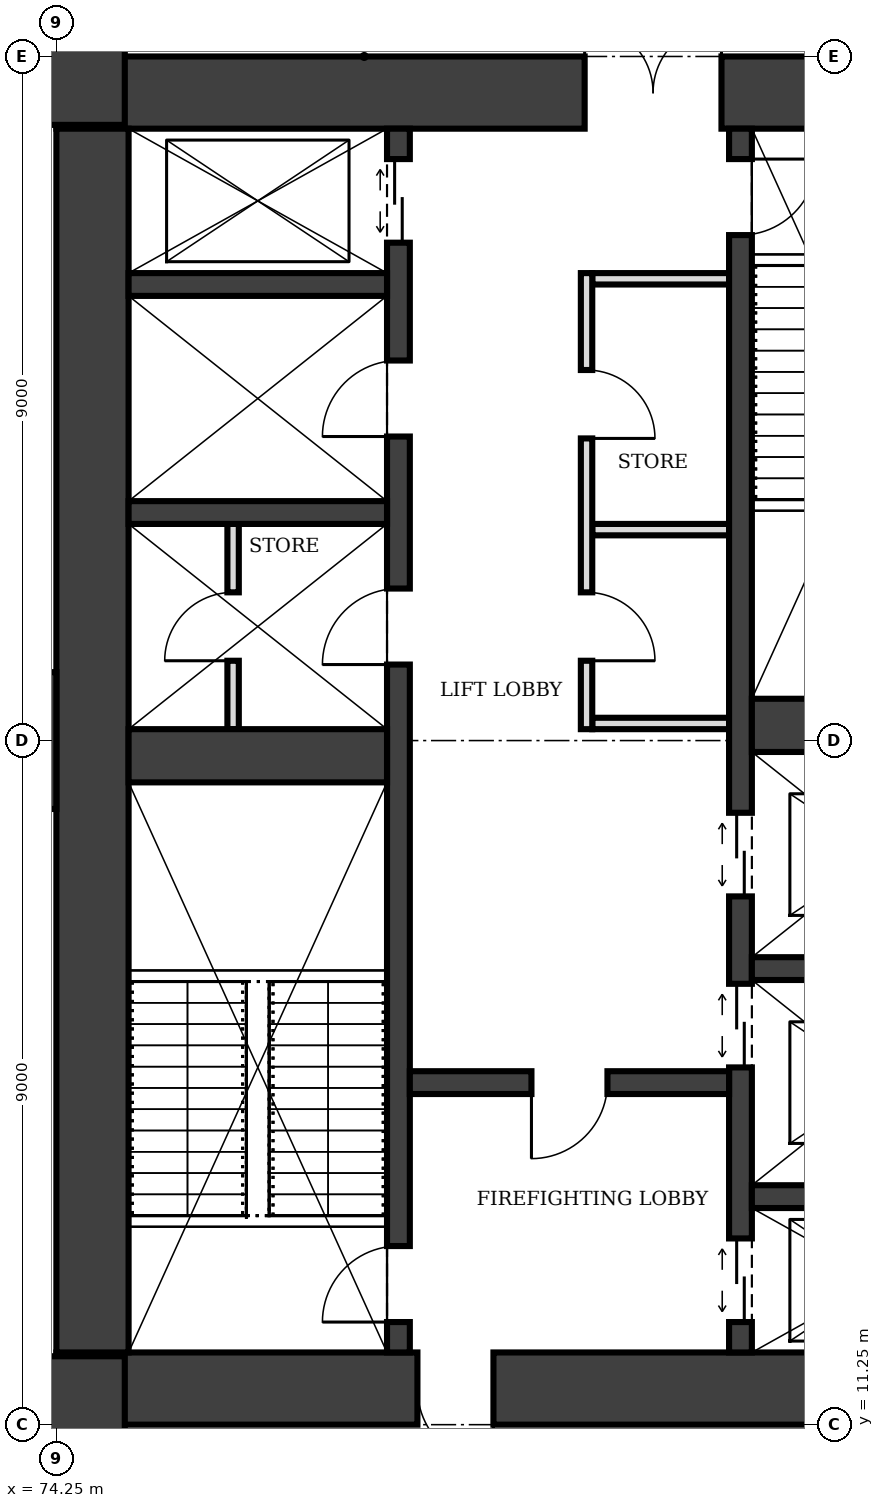
"""IFC4 building model, lengths in metres.
Left out: names, types, materials, properties, quantities, classifications, styles, units other than length and angle.
Written with IfcOpenShell. Run it as: python <this file> out.ifc"""

import sys

from ifc_helpers import new_model, si_unit, direction, frame, frame_2d, origin, place, context, subcontext, project, spatial, rectangle, extrude, element, fill, save


model = new_model("IFC4")
c1 = context("Model", 3, precision=1e-05, world=origin(), true_north=direction((0.0, 1.0)))
c2 = subcontext(c1, "Body", "Model", "MODEL_VIEW")
j1 = project(units=[si_unit("LENGTHUNIT", "METRE"), si_unit("PLANEANGLEUNIT", "RADIAN")], contexts=[c1])
p1 = place(None, origin())
s1 = spatial("IfcSite", under=j1, at=p1, CompositionType="ELEMENT")
p2 = place(p1, origin())
s2 = spatial("IfcBuilding", under=s1, at=p2, CompositionType="ELEMENT")
p3 = place(p2, frame((0.0, 0.0, 169.0)))
s3 = spatial("IfcBuildingStorey", under=s2, at=p3, CompositionType="ELEMENT", Elevation=169.0)
p4 = place(p3, frame((74.25, 11.725, 0.0), z_axis=(0.0, 0.0, 1.0), x_axis=(1.0, 0.0, 0.0)))
e1 = element("IfcWall", 1, at=p4, inside=s3, PredefinedType="SHEAR", context=c2, shape_type="SweptSolid", body=[
    extrude(rectangle(XDim=13.5, YDim=0.95, at=frame_2d((6.75, 0.0))), origin(), (0.0, 0.0, 1.0), 8.0),
])
p5 = place(p4, frame((4.75, 0.0, 0.0)))
e2 = element("IfcOpeningElement", 2, at=p5, cuts=e1, PredefinedType="OPENING", context=c2, shape_type="SweptSolid", body=[
    extrude(rectangle(XDim=1.0, YDim=2.1, at=frame_2d((0.5, 1.05))), frame((0.0, 0.485, 0.0), z_axis=(0.0, -1.0, 0.0), x_axis=(1.0, 0.0, 0.0)), (0.0, 0.0, 1.0), 0.97),
])
p6 = place(p3, frame((87.75, 28.775, 0.0), z_axis=(0.0, 0.0, 1.0), x_axis=(-1.0, 0.0, 0.0)))
e3 = element("IfcWall", 3, at=p6, inside=s3, PredefinedType="SHEAR", context=c2, shape_type="SweptSolid", body=[
    extrude(rectangle(XDim=13.5, YDim=0.95, at=frame_2d((6.75, 0.0))), origin(), (0.0, 0.0, 1.0), 8.0),
])
p7 = place(p6, frame((4.75, 0.0, 0.0)))
e4 = element("IfcOpeningElement", 4, at=p7, cuts=e3, PredefinedType="OPENING", context=c2, shape_type="SweptSolid", body=[
    extrude(rectangle(XDim=1.8, YDim=2.1, at=frame_2d((0.9, 1.05))), frame((0.0, 0.485, 0.0), z_axis=(0.0, -1.0, 0.0), x_axis=(1.0, 0.0, 0.0)), (0.0, 0.0, 1.0), 0.97),
])
p8 = place(p3, frame((74.725, 28.3, 0.0), z_axis=(0.0, 0.0, 1.0), x_axis=(0.0, -1.0, 0.0)))
e5 = element("IfcWall", 5, at=p8, inside=s3, PredefinedType="SHEAR", context=c2, shape_type="SweptSolid", body=[
    extrude(rectangle(XDim=16.1, YDim=0.95, at=frame_2d((8.05, 0.0))), origin(), (0.0, 0.0, 1.0), 8.0),
])
p9 = place(p3, frame((78.75, 12.2, 0.0), z_axis=(0.0, 0.0, 1.0), x_axis=(0.0, 1.0, 0.0)))
e6 = element("IfcWall", 6, at=p9, inside=s3, PredefinedType="SHEAR", context=c2, shape_type="SweptSolid", body=[
    extrude(rectangle(XDim=16.1, YDim=0.3, at=frame_2d((8.05, 0.0))), origin(), (0.0, 0.0, 1.0), 8.0),
])
p10 = place(p9, frame((0.4, 0.0, 0.0)))
e7 = element("IfcOpeningElement", 7, at=p10, cuts=e6, PredefinedType="OPENING", context=c2, shape_type="SweptSolid", body=[
    extrude(rectangle(XDim=1.0, YDim=2.1, at=frame_2d((0.5, 1.05))), frame((0.0, 0.16, 0.0), z_axis=(0.0, -1.0, 0.0), x_axis=(1.0, 0.0, 0.0)), (0.0, 0.0, 1.0), 0.32),
])
p11 = place(p9, frame((14.6, 0.0, 0.0)))
e8 = element("IfcOpeningElement", 8, at=p11, cuts=e6, PredefinedType="OPENING", context=c2, shape_type="SweptSolid", body=[
    extrude(rectangle(XDim=1.1, YDim=2.1, at=frame_2d((0.55, 1.05))), frame((0.0, 0.16, 0.0), z_axis=(0.0, -1.0, 0.0), x_axis=(1.0, 0.0, 0.0)), (0.0, 0.0, 1.0), 0.32),
])
p12 = place(p9, frame((9.05, 0.0, 0.0)))
e9 = element("IfcOpeningElement", 9, at=p12, cuts=e6, PredefinedType="OPENING", context=c2, shape_type="SweptSolid", body=[
    extrude(rectangle(XDim=1.0, YDim=2.1, at=frame_2d((0.5, 1.05))), frame((0.0, 0.16, 0.0), z_axis=(0.0, -1.0, 0.0), x_axis=(1.0, 0.0, 0.0)), (0.0, 0.0, 1.0), 0.32),
])
p13 = place(p9, frame((12.05, 0.0, 0.0)))
e10 = element("IfcOpeningElement", 10, at=p13, cuts=e6, PredefinedType="OPENING", context=c2, shape_type="SweptSolid", body=[
    extrude(rectangle(XDim=1.0, YDim=2.1, at=frame_2d((0.5, 1.05))), frame((0.0, 0.16, 0.0), z_axis=(0.0, -1.0, 0.0), x_axis=(1.0, 0.0, 0.0)), (0.0, 0.0, 1.0), 0.32),
])
p14 = place(p3, frame((83.25, 12.2, 0.0), z_axis=(0.0, 0.0, 1.0), x_axis=(0.0, 1.0, 0.0)))
e11 = element("IfcWall", 11, at=p14, inside=s3, PredefinedType="SHEAR", context=c2, shape_type="SweptSolid", body=[
    extrude(rectangle(XDim=16.1, YDim=0.3, at=frame_2d((8.05, 0.0))), origin(), (0.0, 0.0, 1.0), 8.0),
])
p15 = place(p14, frame((14.7, 0.0, 0.0)))
e12 = element("IfcOpeningElement", 12, at=p15, cuts=e11, PredefinedType="OPENING", context=c2, shape_type="SweptSolid", body=[
    extrude(rectangle(XDim=1.0, YDim=2.1, at=frame_2d((0.5, 1.05))), frame((0.0, 0.16, 0.0), z_axis=(0.0, -1.0, 0.0), x_axis=(1.0, 0.0, 0.0)), (0.0, 0.0, 1.0), 0.32),
])
p16 = place(p14, frame((0.4, 0.0, 0.0)))
e13 = element("IfcOpeningElement", 13, at=p16, cuts=e11, PredefinedType="OPENING", context=c2, shape_type="SweptSolid", body=[
    extrude(rectangle(XDim=1.1, YDim=2.1, at=frame_2d((0.55, 1.05))), frame((0.0, 0.16, 0.0), z_axis=(0.0, -1.0, 0.0), x_axis=(1.0, 0.0, 0.0)), (0.0, 0.0, 1.0), 0.32),
])
p17 = place(p14, frame((3.75, 0.0, 0.0)))
e14 = element("IfcOpeningElement", 14, at=p17, cuts=e11, PredefinedType="OPENING", context=c2, shape_type="SweptSolid", body=[
    extrude(rectangle(XDim=1.1, YDim=2.1, at=frame_2d((0.55, 1.05))), frame((0.0, 0.16, 0.0), z_axis=(0.0, -1.0, 0.0), x_axis=(1.0, 0.0, 0.0)), (0.0, 0.0, 1.0), 0.32),
])
p18 = place(p14, frame((6.0, 0.0, 0.0)))
e15 = element("IfcOpeningElement", 15, at=p18, cuts=e11, PredefinedType="OPENING", context=c2, shape_type="SweptSolid", body=[
    extrude(rectangle(XDim=1.1, YDim=2.1, at=frame_2d((0.55, 1.05))), frame((0.0, 0.16, 0.0), z_axis=(0.0, -1.0, 0.0), x_axis=(1.0, 0.0, 0.0)), (0.0, 0.0, 1.0), 0.32),
])
p19 = place(p3, frame((75.2, 20.05, 0.0), z_axis=(0.0, 0.0, 1.0), x_axis=(1.0, 0.0, 0.0)))
e16 = element("IfcWall", 16, at=p19, inside=s3, PredefinedType="SHEAR", context=c2, shape_type="SweptSolid", body=[
    extrude(rectangle(XDim=3.4, YDim=0.7, at=frame_2d((1.7, 0.0))), origin(), (0.0, 0.0, 1.0), 8.0),
])
p20 = place(p3, frame((78.9, 15.75, 0.0), z_axis=(0.0, 0.0, 1.0), x_axis=(1.0, 0.0, 0.0)))
e17 = element("IfcWall", 17, at=p20, inside=s3, PredefinedType="SHEAR", context=c2, shape_type="SweptSolid", body=[
    extrude(rectangle(XDim=4.2, YDim=0.3, at=frame_2d((2.1, 0.0))), origin(), (0.0, 0.0, 1.0), 8.0),
])
p21 = place(p20, frame((1.6, 0.0, 0.0)))
e18 = element("IfcOpeningElement", 18, at=p21, cuts=e17, PredefinedType="OPENING", context=c2, shape_type="SweptSolid", body=[
    extrude(rectangle(XDim=1.0, YDim=2.1, at=frame_2d((0.5, 1.05))), frame((0.0, 0.16, 0.0), z_axis=(0.0, -1.0, 0.0), x_axis=(1.0, 0.0, 0.0)), (0.0, 0.0, 1.0), 0.32),
])
for number, where, z_axis, x_axis in (
    (19, (83.4, 14.25, 0.0), (0.0, 0.0, 1.0), (1.0, 0.0, 0.0)),
    (20, (83.4, 17.25, 0.0), (0.0, 0.0, 1.0), (1.0, 0.0, 0.0)),
):
    element("IfcWall", number, at=place(p3, frame(where, z_axis=z_axis, x_axis=x_axis)), inside=s3, PredefinedType="SHEAR", context=c2, shape_type="SweptSolid", body=[
        extrude(rectangle(XDim=3.4, YDim=0.3, at=frame_2d((1.7, 0.0))), origin(), (0.0, 0.0, 1.0), 8.0),
    ])
p22 = place(p3, frame((83.4, 20.45, 0.0), z_axis=(0.0, 0.0, 1.0), x_axis=(1.0, 0.0, 0.0)))
e21 = element("IfcWall", 21, at=p22, inside=s3, PredefinedType="SHEAR", context=c2, shape_type="SweptSolid", body=[
    extrude(rectangle(XDim=3.4, YDim=0.7, at=frame_2d((1.7, 0.0))), origin(), (0.0, 0.0, 1.0), 8.0),
])
for number, where, z_axis, x_axis in (
    (22, (75.2, 23.25, 0.0), (0.0, 0.0, 1.0), (1.0, 0.0, 0.0)),
    (23, (75.2, 26.25, 0.0), (0.0, 0.0, 1.0), (1.0, 0.0, 0.0)),
):
    element("IfcWall", number, at=place(p3, frame(where, z_axis=z_axis, x_axis=x_axis)), inside=s3, PredefinedType="SHEAR", context=c2, shape_type="SweptSolid", body=[
        extrude(rectangle(XDim=3.4, YDim=0.3, at=frame_2d((1.7, 0.0))), origin(), (0.0, 0.0, 1.0), 8.0),
    ])
p23 = place(p3, frame((74.25, 4.5, 0.0), z_axis=(0.0, 0.0, 1.0), x_axis=(0.0, 1.0, 0.0)))
e24 = element("IfcWall", 24, at=p23, inside=s3, PredefinedType="SHEAR", context=c2, shape_type="SweptSolid", body=[
    extrude(rectangle(XDim=7.65, YDim=1.8, at=frame_2d((3.825, 0.0))), origin(), (0.0, 0.0, 1.0), 8.0),
])
p24 = place(p23, frame((2.775, 0.0, 0.0)))
e25 = element("IfcOpeningElement", 25, at=p24, cuts=e24, PredefinedType="OPENING", context=c2, shape_type="SweptSolid", body=[
    extrude(rectangle(XDim=1.2, YDim=2.1, at=frame_2d((0.6, 1.05))), frame((0.0, 0.91, 0.0), z_axis=(0.0, -1.0, 0.0), x_axis=(1.0, 0.0, 0.0)), (0.0, 0.0, 1.0), 1.82),
])
p25 = place(p3, frame((74.25, 28.35, 0.0), z_axis=(0.0, 0.0, 1.0), x_axis=(0.0, 1.0, 0.0)))
e26 = element("IfcWall", 26, at=p25, inside=s3, PredefinedType="SHEAR", context=c2, shape_type="SweptSolid", body=[
    extrude(rectangle(XDim=7.65, YDim=1.8, at=frame_2d((3.825, 0.0))), origin(), (0.0, 0.0, 1.0), 8.0),
])
p26 = place(p25, frame((3.675, 0.0, 0.0)))
e27 = element("IfcOpeningElement", 27, at=p26, cuts=e26, PredefinedType="OPENING", context=c2, shape_type="SweptSolid", body=[
    extrude(rectangle(XDim=1.2, YDim=2.1, at=frame_2d((0.6, 1.05))), frame((0.0, 0.91, 0.0), z_axis=(0.0, -1.0, 0.0), x_axis=(1.0, 0.0, 0.0)), (0.0, 0.0, 1.0), 1.82),
])
p27 = place(p3, frame((67.5, 20.25, 0.0), z_axis=(0.0, 0.0, 1.0), x_axis=(1.0, 0.0, 0.0)))
e28 = element("IfcWall", 28, at=p27, inside=s3, PredefinedType="SHEAR", context=c2, shape_type="SweptSolid", body=[
    extrude(rectangle(XDim=6.75, YDim=1.8, at=frame_2d((3.375, 0.0))), origin(), (0.0, 0.0, 1.0), 8.0),
])
p28 = place(p27, frame((2.775, 0.0, 0.0)))
e29 = element("IfcOpeningElement", 29, at=p28, cuts=e28, PredefinedType="OPENING", context=c2, shape_type="SweptSolid", body=[
    extrude(rectangle(XDim=1.2, YDim=2.1, at=frame_2d((0.6, 1.05))), frame((0.0, 0.91, 0.0), z_axis=(0.0, -1.0, 0.0), x_axis=(1.0, 0.0, 0.0)), (0.0, 0.0, 1.0), 1.82),
])
p29 = place(p3, frame((81.225, 20.4, 0.0), z_axis=(0.0, 0.0, 1.0), x_axis=(0.0, 1.0, 0.0)))
e30 = element("IfcWall", 30, at=p29, inside=s3, PredefinedType="PARTITIONING", context=c2, shape_type="SweptSolid", body=[
    extrude(rectangle(XDim=6.0, YDim=0.15, at=frame_2d((3.0, 0.0))), origin(), (0.0, 0.0, 1.0), 7.75),
])
p30 = place(p29, frame((0.9, 0.0, 0.0)))
e31 = element("IfcOpeningElement", 31, at=p30, cuts=e30, PredefinedType="OPENING", context=c2, shape_type="SweptSolid", body=[
    extrude(rectangle(XDim=0.9, YDim=2.1, at=frame_2d((0.45, 1.05))), frame((0.0, 0.085, 0.0), z_axis=(0.0, -1.0, 0.0), x_axis=(1.0, 0.0, 0.0)), (0.0, 0.0, 1.0), 0.17),
])
p31 = place(p29, frame((3.825, 0.0, 0.0)))
e32 = element("IfcOpeningElement", 32, at=p31, cuts=e30, PredefinedType="OPENING", context=c2, shape_type="SweptSolid", body=[
    extrude(rectangle(XDim=0.9, YDim=2.1, at=frame_2d((0.45, 1.05))), frame((0.0, 0.085, 0.0), z_axis=(0.0, -1.0, 0.0), x_axis=(1.0, 0.0, 0.0)), (0.0, 0.0, 1.0), 0.17),
])
for number, where, z_axis, x_axis in (
    (33, (81.3, 20.475, 0.0), (0.0, 0.0, 1.0), (1.0, 0.0, 0.0)),
    (34, (81.3, 23.025, 0.0), (0.0, 0.0, 1.0), (1.0, 0.0, 0.0)),
    (35, (81.3, 26.325, 0.0), (0.0, 0.0, 1.0), (1.0, 0.0, 0.0)),
):
    element("IfcWall", number, at=place(p3, frame(where, z_axis=z_axis, x_axis=x_axis)), inside=s3, PredefinedType="PARTITIONING", context=c2, shape_type="SweptSolid", body=[
        extrude(rectangle(XDim=1.8, YDim=0.15, at=frame_2d((0.9, 0.0))), origin(), (0.0, 0.0, 1.0), 7.75),
    ])
p32 = place(p3, frame((76.575, 20.4, 0.0), z_axis=(0.0, 0.0, 1.0), x_axis=(0.0, 1.0, 0.0)))
e36 = element("IfcWall", 36, at=p32, inside=s3, PredefinedType="PARTITIONING", context=c2, shape_type="SweptSolid", body=[
    extrude(rectangle(XDim=2.7, YDim=0.15, at=frame_2d((1.35, 0.0))), origin(), (0.0, 0.0, 1.0), 7.75),
])
p33 = place(p32, frame((0.9, 0.0, 0.0)))
e37 = element("IfcOpeningElement", 37, at=p33, cuts=e36, PredefinedType="OPENING", context=c2, shape_type="SweptSolid", body=[
    extrude(rectangle(XDim=0.9, YDim=2.1, at=frame_2d((0.45, 1.05))), frame((0.0, 0.085, 0.0), z_axis=(0.0, -1.0, 0.0), x_axis=(1.0, 0.0, 0.0)), (0.0, 0.0, 1.0), 0.17),
])
p34 = place(p5, frame((1.0, 0.0, 0.0), z_axis=(0.0, 0.0, 1.0), x_axis=(-1.0, 0.0, 0.0)))
e38 = element("IfcDoor", 38, at=p34, inside=s3, OperationType="SINGLE_SWING_LEFT", PredefinedType="DOOR", context=c2, shape_type="SweptSolid", body=[
    extrude(rectangle(XDim=1.0, YDim=2.1, at=frame_2d((0.5, 1.05))), frame((0.0, 0.025, 0.0), z_axis=(0.0, -1.0, 0.0), x_axis=(1.0, 0.0, 0.0)), (0.0, 0.0, 1.0), 0.05),
])
fill(e2, e38)
p35 = place(p7, frame((1.8, 0.0, 0.0), z_axis=(0.0, 0.0, 1.0), x_axis=(-1.0, 0.0, 0.0)))
e39 = element("IfcDoor", 39, at=p35, inside=s3, OperationType="DOUBLE_DOOR_SINGLE_SWING", PredefinedType="DOOR", context=c2, shape_type="SweptSolid", body=[
    extrude(rectangle(XDim=1.8, YDim=2.1, at=frame_2d((0.9, 1.05))), frame((0.0, 0.025, 0.0), z_axis=(0.0, -1.0, 0.0), x_axis=(1.0, 0.0, 0.0)), (0.0, 0.0, 1.0), 0.05),
])
fill(e4, e39)
p36 = place(p21, frame((1.0, 0.0, 0.0), z_axis=(0.0, 0.0, 1.0), x_axis=(-1.0, 0.0, 0.0)))
e40 = element("IfcDoor", 40, at=p36, inside=s3, OperationType="SINGLE_SWING_RIGHT", PredefinedType="DOOR", context=c2, shape_type="SweptSolid", body=[
    extrude(rectangle(XDim=1.0, YDim=2.1, at=frame_2d((0.5, 1.05))), frame((0.0, 0.025, 0.0), z_axis=(0.0, -1.0, 0.0), x_axis=(1.0, 0.0, 0.0)), (0.0, 0.0, 1.0), 0.05),
])
fill(e18, e40)
p37 = place(p10, origin())
e41 = element("IfcDoor", 41, at=p37, inside=s3, OperationType="SINGLE_SWING_LEFT", PredefinedType="DOOR", context=c2, shape_type="SweptSolid", body=[
    extrude(rectangle(XDim=1.0, YDim=2.1, at=frame_2d((0.5, 1.05))), frame((0.0, 0.025, 0.0), z_axis=(0.0, -1.0, 0.0), x_axis=(1.0, 0.0, 0.0)), (0.0, 0.0, 1.0), 0.05),
])
fill(e7, e41)
p38 = place(p15, frame((1.0, 0.0, 0.0), z_axis=(0.0, 0.0, 1.0), x_axis=(-1.0, 0.0, 0.0)))
e42 = element("IfcDoor", 42, at=p38, inside=s3, OperationType="SINGLE_SWING_LEFT", PredefinedType="DOOR", context=c2, shape_type="SweptSolid", body=[
    extrude(rectangle(XDim=1.0, YDim=2.1, at=frame_2d((0.5, 1.05))), frame((0.0, 0.025, 0.0), z_axis=(0.0, -1.0, 0.0), x_axis=(1.0, 0.0, 0.0)), (0.0, 0.0, 1.0), 0.05),
])
fill(e12, e42)
p39 = place(p16, origin())
e43 = element("IfcDoor", 43, at=p39, inside=s3, OperationType="DOUBLE_DOOR_SLIDING", PredefinedType="DOOR", context=c2, shape_type="SweptSolid", body=[
    extrude(rectangle(XDim=1.1, YDim=2.1, at=frame_2d((0.55, 1.05))), frame((0.0, 0.025, 0.0), z_axis=(0.0, -1.0, 0.0), x_axis=(1.0, 0.0, 0.0)), (0.0, 0.0, 1.0), 0.05),
])
fill(e13, e43)
p40 = place(p11, origin())
e44 = element("IfcDoor", 44, at=p40, inside=s3, OperationType="DOUBLE_DOOR_SLIDING", PredefinedType="DOOR", context=c2, shape_type="SweptSolid", body=[
    extrude(rectangle(XDim=1.1, YDim=2.1, at=frame_2d((0.55, 1.05))), frame((0.0, 0.025, 0.0), z_axis=(0.0, -1.0, 0.0), x_axis=(1.0, 0.0, 0.0)), (0.0, 0.0, 1.0), 0.05),
])
fill(e8, e44)
p41 = place(p17, origin())
e45 = element("IfcDoor", 45, at=p41, inside=s3, OperationType="DOUBLE_DOOR_SLIDING", PredefinedType="DOOR", context=c2, shape_type="SweptSolid", body=[
    extrude(rectangle(XDim=1.1, YDim=2.1, at=frame_2d((0.55, 1.05))), frame((0.0, 0.025, 0.0), z_axis=(0.0, -1.0, 0.0), x_axis=(1.0, 0.0, 0.0)), (0.0, 0.0, 1.0), 0.05),
])
fill(e14, e45)
p42 = place(p18, origin())
e46 = element("IfcDoor", 46, at=p42, inside=s3, OperationType="DOUBLE_DOOR_SLIDING", PredefinedType="DOOR", context=c2, shape_type="SweptSolid", body=[
    extrude(rectangle(XDim=1.1, YDim=2.1, at=frame_2d((0.55, 1.05))), frame((0.0, 0.025, 0.0), z_axis=(0.0, -1.0, 0.0), x_axis=(1.0, 0.0, 0.0)), (0.0, 0.0, 1.0), 0.05),
])
fill(e15, e46)
p43 = place(p30, frame((0.9, 0.0, 0.0), z_axis=(0.0, 0.0, 1.0), x_axis=(-1.0, 0.0, 0.0)))
e47 = element("IfcDoor", 47, at=p43, inside=s3, OperationType="SINGLE_SWING_RIGHT", PredefinedType="DOOR", context=c2, shape_type="SweptSolid", body=[
    extrude(rectangle(XDim=0.9, YDim=2.1, at=frame_2d((0.45, 1.05))), frame((0.0, 0.025, 0.0), z_axis=(0.0, -1.0, 0.0), x_axis=(1.0, 0.0, 0.0)), (0.0, 0.0, 1.0), 0.05),
])
fill(e31, e47)
p44 = place(p31, frame((0.9, 0.0, 0.0), z_axis=(0.0, 0.0, 1.0), x_axis=(-1.0, 0.0, 0.0)))
e48 = element("IfcDoor", 48, at=p44, inside=s3, OperationType="SINGLE_SWING_RIGHT", PredefinedType="DOOR", context=c2, shape_type="SweptSolid", body=[
    extrude(rectangle(XDim=0.9, YDim=2.1, at=frame_2d((0.45, 1.05))), frame((0.0, 0.025, 0.0), z_axis=(0.0, -1.0, 0.0), x_axis=(1.0, 0.0, 0.0)), (0.0, 0.0, 1.0), 0.05),
])
fill(e32, e48)
p45 = place(p12, origin())
e49 = element("IfcDoor", 49, at=p45, inside=s3, OperationType="SINGLE_SWING_LEFT", PredefinedType="DOOR", context=c2, shape_type="SweptSolid", body=[
    extrude(rectangle(XDim=1.0, YDim=2.1, at=frame_2d((0.5, 1.05))), frame((0.0, 0.025, 0.0), z_axis=(0.0, -1.0, 0.0), x_axis=(1.0, 0.0, 0.0)), (0.0, 0.0, 1.0), 0.05),
])
fill(e9, e49)
p46 = place(p33, origin())
e50 = element("IfcDoor", 50, at=p46, inside=s3, OperationType="SINGLE_SWING_LEFT", PredefinedType="DOOR", context=c2, shape_type="SweptSolid", body=[
    extrude(rectangle(XDim=0.9, YDim=2.1, at=frame_2d((0.45, 1.05))), frame((0.0, 0.025, 0.0), z_axis=(0.0, -1.0, 0.0), x_axis=(1.0, 0.0, 0.0)), (0.0, 0.0, 1.0), 0.05),
])
fill(e37, e50)
p47 = place(p13, origin())
e51 = element("IfcDoor", 51, at=p47, inside=s3, OperationType="SINGLE_SWING_LEFT", PredefinedType="DOOR", context=c2, shape_type="SweptSolid", body=[
    extrude(rectangle(XDim=1.0, YDim=2.1, at=frame_2d((0.5, 1.05))), frame((0.0, 0.025, 0.0), z_axis=(0.0, -1.0, 0.0), x_axis=(1.0, 0.0, 0.0)), (0.0, 0.0, 1.0), 0.05),
])
fill(e10, e51)
save(model, sys.argv[1])
